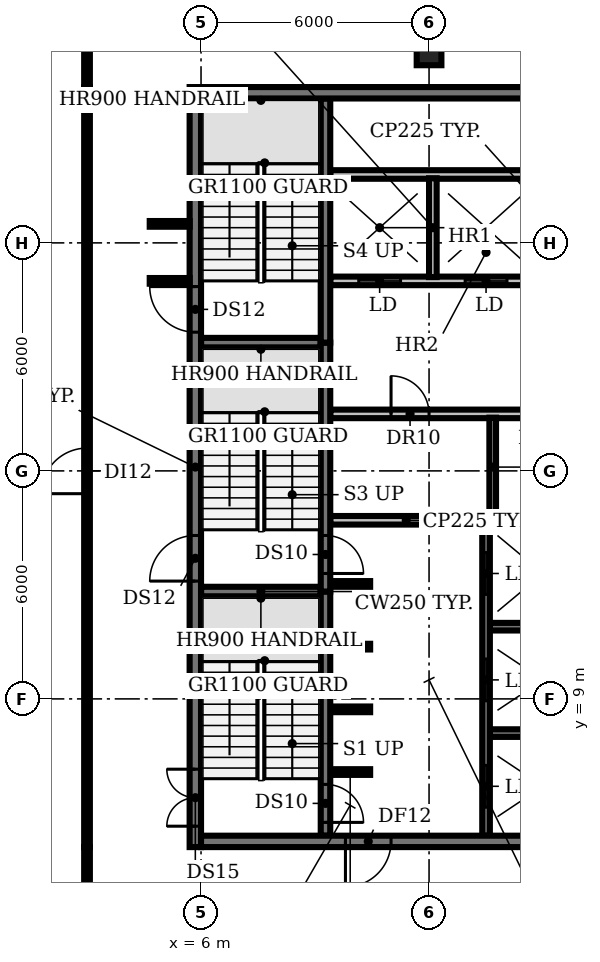
"""IFC4 building model, lengths in metres.
Left out: names, types, materials, properties, quantities, classifications, styles, units other than length and angle.
Written with IfcOpenShell. Run it as: python <this file> out.ifc"""

import sys

from ifc_helpers import new_model, si_unit, direction, frame, frame_2d, origin, origin_2d, place, context, subcontext, project, spatial, rectangle, extrude, element, fill, save


model = new_model("IFC4")
c1 = context("Model", 3, precision=1e-05, world=origin(), true_north=direction((0.0, 1.0)))
c2 = subcontext(c1, "Body", "Model", "MODEL_VIEW")
j1 = project(units=[si_unit("LENGTHUNIT", "METRE"), si_unit("PLANEANGLEUNIT", "RADIAN")], contexts=[c1])
p1 = place(None, origin())
s1 = spatial("IfcSite", under=j1, at=p1, CompositionType="ELEMENT")
p2 = place(p1, origin())
s2 = spatial("IfcBuilding", under=s1, at=p2, CompositionType="ELEMENT")
p3 = place(p2, frame((0.0, 0.0, 281.0)))
s3 = spatial("IfcBuildingStorey", under=s2, at=p3, CompositionType="ELEMENT", Elevation=281.0)
p4 = place(p3, frame((12.0, 26.0, 0.0), z_axis=(0.0, 0.0, 1.0), x_axis=(1.0, 0.0, 0.0)))
e1 = element("IfcColumn", 1, at=p4, inside=s3, PredefinedType="COLUMN", context=c2, shape_type="SweptSolid", body=[
    extrude(rectangle(XDim=0.65, YDim=0.65, at=origin_2d()), origin(), (0.0, 0.0, 1.0), 3.85),
])
p5 = place(p3, frame((9.4, 7.075, 0.0), z_axis=(0.0, 0.0, 1.0), x_axis=(1.0, 0.0, 0.0)))
e2 = element("IfcWall", 2, at=p5, inside=s3, PredefinedType="SHEAR", context=c2, shape_type="SweptSolid", body=[
    extrude(rectangle(XDim=1.05, YDim=0.15, at=frame_2d((0.525, 0.0))), origin(), (0.0, 0.0, 1.0), 3.85),
])
p6 = place(p3, frame((13.6, 8.1, 0.0), z_axis=(0.0, 0.0, 1.0), x_axis=(1.0, 0.0, 0.0)))
e3 = element("IfcWall", 3, at=p6, inside=s3, PredefinedType="SHEAR", context=c2, shape_type="SweptSolid", body=[
    extrude(rectangle(XDim=2.8, YDim=0.2, at=frame_2d((1.4, 0.0))), origin(), (0.0, 0.0, 1.0), 3.85),
])
for number, where, z_axis, x_axis in (
    (4, (9.4, 8.725, 0.0), (0.0, 0.0, 1.0), (1.0, 0.0, 0.0)),
    (5, (9.4, 10.375, 0.0), (0.0, 0.0, 1.0), (1.0, 0.0, 0.0)),
):
    element("IfcWall", number, at=place(p3, frame(where, z_axis=z_axis, x_axis=x_axis)), inside=s3, PredefinedType="SHEAR", context=c2, shape_type="SweptSolid", body=[
        extrude(rectangle(XDim=1.05, YDim=0.15, at=frame_2d((0.525, 0.0))), origin(), (0.0, 0.0, 1.0), 3.85),
    ])
p7 = place(p3, frame((13.6, 10.9, 0.0), z_axis=(0.0, 0.0, 1.0), x_axis=(1.0, 0.0, 0.0)))
e6 = element("IfcWall", 6, at=p7, inside=s3, PredefinedType="SHEAR", context=c2, shape_type="SweptSolid", body=[
    extrude(rectangle(XDim=2.8, YDim=0.2, at=frame_2d((1.4, 0.0))), origin(), (0.0, 0.0, 1.0), 3.85),
])
p8 = place(p3, frame((6.0, 11.825, 0.0), z_axis=(0.0, 0.0, 1.0), x_axis=(1.0, 0.0, 0.0)))
e7 = element("IfcWall", 7, at=p8, inside=s3, PredefinedType="SHEAR", context=c2, shape_type="SweptSolid", body=[
    extrude(rectangle(XDim=3.15, YDim=0.25, at=frame_2d((1.575, 0.0))), origin(), (0.0, 0.0, 1.0), 3.85),
])
p9 = place(p3, frame((9.4, 12.025, 0.0), z_axis=(0.0, 0.0, 1.0), x_axis=(1.0, 0.0, 0.0)))
e8 = element("IfcWall", 8, at=p9, inside=s3, PredefinedType="SHEAR", context=c2, shape_type="SweptSolid", body=[
    extrude(rectangle(XDim=1.05, YDim=0.15, at=frame_2d((0.525, 0.0))), origin(), (0.0, 0.0, 1.0), 3.85),
])
p10 = place(p3, frame((9.4, 13.7, 0.0), z_axis=(0.0, 0.0, 1.0), x_axis=(1.0, 0.0, 0.0)))
e9 = element("IfcWall", 9, at=p10, inside=s3, PredefinedType="PARTITIONING", context=c2, shape_type="SweptSolid", body=[
    extrude(rectangle(XDim=4.0, YDim=0.225, at=frame_2d((2.0, 0.0))), origin(), (0.0, 0.0, 1.0), 3.85),
])
p11 = place(p3, frame((13.75, 13.7, 0.0), z_axis=(0.0, 0.0, 1.0), x_axis=(1.0, 0.0, 0.0)))
e10 = element("IfcWall", 10, at=p11, inside=s3, PredefinedType="SHEAR", context=c2, shape_type="SweptSolid", body=[
    extrude(rectangle(XDim=2.45, YDim=0.2, at=frame_2d((1.225, 0.0))), origin(), (0.0, 0.0, 1.0), 3.85),
])
p12 = place(p3, frame((9.4, 16.5, 0.0), z_axis=(0.0, 0.0, 1.0), x_axis=(1.0, 0.0, 0.0)))
e11 = element("IfcWall", 11, at=p12, inside=s3, PredefinedType="PARTITIONING", context=c2, shape_type="SweptSolid", body=[
    extrude(rectangle(XDim=14.6, YDim=0.225, at=frame_2d((7.3, 0.0))), origin(), (0.0, 0.0, 1.0), 3.85),
])
p13 = place(p12, frame((1.6, 0.0, 0.0)))
e12 = element("IfcOpeningElement", 12, at=p13, cuts=e11, PredefinedType="OPENING", context=c2, shape_type="SweptSolid", body=[
    extrude(rectangle(XDim=1.0, YDim=2.1, at=frame_2d((0.5, 1.05))), frame((0.0, 0.123, 0.0), z_axis=(0.0, -1.0, 0.0), x_axis=(1.0, 0.0, 0.0)), (0.0, 0.0, 1.0), 0.245),
])
p14 = place(p12, frame((5.125, 0.0, 0.0)))
e13 = element("IfcOpeningElement", 13, at=p14, cuts=e11, PredefinedType="OPENING", context=c2, shape_type="SweptSolid", body=[
    extrude(rectangle(XDim=0.9, YDim=2.1, at=frame_2d((0.45, 1.05))), frame((0.0, 0.123, 0.0), z_axis=(0.0, -1.0, 0.0), x_axis=(1.0, 0.0, 0.0)), (0.0, 0.0, 1.0), 0.245),
])
p15 = place(p12, frame((7.675, 0.0, 0.0)))
e14 = element("IfcOpeningElement", 14, at=p15, cuts=e11, PredefinedType="OPENING", context=c2, shape_type="SweptSolid", body=[
    extrude(rectangle(XDim=0.9, YDim=2.1, at=frame_2d((0.45, 1.05))), frame((0.0, 0.123, 0.0), z_axis=(0.0, -1.0, 0.0), x_axis=(1.0, 0.0, 0.0)), (0.0, 0.0, 1.0), 0.245),
])
p16 = place(p12, frame((9.775, 0.0, 0.0)))
e15 = element("IfcOpeningElement", 15, at=p16, cuts=e11, PredefinedType="OPENING", context=c2, shape_type="SweptSolid", body=[
    extrude(rectangle(XDim=0.9, YDim=2.1, at=frame_2d((0.45, 1.05))), frame((0.0, 0.123, 0.0), z_axis=(0.0, -1.0, 0.0), x_axis=(1.0, 0.0, 0.0)), (0.0, 0.0, 1.0), 0.245),
])
p17 = place(p12, frame((12.4, 0.0, 0.0)))
e16 = element("IfcOpeningElement", 16, at=p17, cuts=e11, PredefinedType="OPENING", context=c2, shape_type="SweptSolid", body=[
    extrude(rectangle(XDim=1.0, YDim=2.1, at=frame_2d((0.5, 1.05))), frame((0.0, 0.123, 0.0), z_axis=(0.0, -1.0, 0.0), x_axis=(1.0, 0.0, 0.0)), (0.0, 0.0, 1.0), 0.245),
])
p18 = place(p3, frame((6.0, 18.375, 0.0), z_axis=(0.0, 0.0, 1.0), x_axis=(1.0, 0.0, 0.0)))
e17 = element("IfcWall", 17, at=p18, inside=s3, PredefinedType="SHEAR", context=c2, shape_type="SweptSolid", body=[
    extrude(rectangle(XDim=3.15, YDim=0.25, at=frame_2d((1.575, 0.0))), origin(), (0.0, 0.0, 1.0), 3.85),
])
p19 = place(p3, frame((24.0, 20.0, 0.0), z_axis=(0.0, 0.0, 1.0), x_axis=(-1.0, 0.0, 0.0)))
e18 = element("IfcWall", 18, at=p19, inside=s3, PredefinedType="PARTITIONING", context=c2, shape_type="SweptSolid", body=[
    extrude(rectangle(XDim=14.6, YDim=0.225, at=frame_2d((7.3, 0.0))), origin(), (0.0, 0.0, 1.0), 3.85),
])
p20 = place(p19, frame((12.75, 0.0, 0.0)))
e19 = element("IfcOpeningElement", 19, at=p20, cuts=e18, PredefinedType="OPENING", context=c2, shape_type="SweptSolid", body=[
    extrude(rectangle(XDim=1.1, YDim=2.1, at=frame_2d((0.55, 1.05))), frame((0.0, 0.123, 0.0), z_axis=(0.0, -1.0, 0.0), x_axis=(1.0, 0.0, 0.0)), (0.0, 0.0, 1.0), 0.245),
])
p21 = place(p19, frame((9.95, 0.0, 0.0)))
e20 = element("IfcOpeningElement", 20, at=p21, cuts=e18, PredefinedType="OPENING", context=c2, shape_type="SweptSolid", body=[
    extrude(rectangle(XDim=1.1, YDim=2.1, at=frame_2d((0.55, 1.05))), frame((0.0, 0.123, 0.0), z_axis=(0.0, -1.0, 0.0), x_axis=(1.0, 0.0, 0.0)), (0.0, 0.0, 1.0), 0.245),
])
p22 = place(p19, frame((7.15, 0.0, 0.0)))
e21 = element("IfcOpeningElement", 21, at=p22, cuts=e18, PredefinedType="OPENING", context=c2, shape_type="SweptSolid", body=[
    extrude(rectangle(XDim=1.1, YDim=2.1, at=frame_2d((0.55, 1.05))), frame((0.0, 0.123, 0.0), z_axis=(0.0, -1.0, 0.0), x_axis=(1.0, 0.0, 0.0)), (0.0, 0.0, 1.0), 0.245),
])
p23 = place(p19, frame((4.35, 0.0, 0.0)))
e22 = element("IfcOpeningElement", 22, at=p23, cuts=e18, PredefinedType="OPENING", context=c2, shape_type="SweptSolid", body=[
    extrude(rectangle(XDim=1.1, YDim=2.1, at=frame_2d((0.55, 1.05))), frame((0.0, 0.123, 0.0), z_axis=(0.0, -1.0, 0.0), x_axis=(1.0, 0.0, 0.0)), (0.0, 0.0, 1.0), 0.245),
])
p24 = place(p19, frame((1.2, 0.0, 0.0)))
e23 = element("IfcOpeningElement", 23, at=p24, cuts=e18, PredefinedType="OPENING", context=c2, shape_type="SweptSolid", body=[
    extrude(rectangle(XDim=1.0, YDim=2.1, at=frame_2d((0.5, 1.05))), frame((0.0, 0.123, 0.0), z_axis=(0.0, -1.0, 0.0), x_axis=(1.0, 0.0, 0.0)), (0.0, 0.0, 1.0), 0.245),
])
p25 = place(p3, frame((9.4, 22.8, 0.0), z_axis=(0.0, 0.0, 1.0), x_axis=(1.0, 0.0, 0.0)))
e24 = element("IfcWall", 24, at=p25, inside=s3, PredefinedType="PARTITIONING", context=c2, shape_type="SweptSolid", body=[
    extrude(rectangle(XDim=14.6, YDim=0.225, at=frame_2d((7.3, 0.0))), origin(), (0.0, 0.0, 1.0), 3.85),
])
p26 = place(p3, frame((9.275, 11.825, 0.0), z_axis=(0.0, 0.0, 1.0), x_axis=(0.0, -1.0, 0.0)))
e25 = element("IfcWall", 25, at=p26, inside=s3, PredefinedType="SHEAR", context=c2, shape_type="SweptSolid", body=[
    extrude(rectangle(XDim=6.425, YDim=0.25, at=frame_2d((3.212, 0.0))), origin(), (0.0, 0.0, 1.0), 3.85),
])
p27 = place(p26, frame((5.075, 0.0, 0.0)))
e26 = element("IfcOpeningElement", 26, at=p27, cuts=e25, PredefinedType="OPENING", context=c2, shape_type="SweptSolid", body=[
    extrude(rectangle(XDim=1.0, YDim=2.1, at=frame_2d((0.5, 1.05))), frame((0.0, 0.135, 0.0), z_axis=(0.0, -1.0, 0.0), x_axis=(1.0, 0.0, 0.0)), (0.0, 0.0, 1.0), 0.27),
])
p28 = place(p3, frame((9.275, 18.375, 0.0), z_axis=(0.0, 0.0, 1.0), x_axis=(0.0, -1.0, 0.0)))
e27 = element("IfcWall", 27, at=p28, inside=s3, PredefinedType="SHEAR", context=c2, shape_type="SweptSolid", body=[
    extrude(rectangle(XDim=6.55, YDim=0.25, at=frame_2d((3.275, 0.0))), origin(), (0.0, 0.0, 1.0), 3.85),
])
p29 = place(p28, frame((5.075, 0.0, 0.0)))
e28 = element("IfcOpeningElement", 28, at=p29, cuts=e27, PredefinedType="OPENING", context=c2, shape_type="SweptSolid", body=[
    extrude(rectangle(XDim=1.0, YDim=2.1, at=frame_2d((0.5, 1.05))), frame((0.0, 0.135, 0.0), z_axis=(0.0, -1.0, 0.0), x_axis=(1.0, 0.0, 0.0)), (0.0, 0.0, 1.0), 0.27),
])
p30 = place(p3, frame((9.275, 18.375, 0.0), z_axis=(0.0, 0.0, 1.0), x_axis=(0.0, 1.0, 0.0)))
e29 = element("IfcWall", 29, at=p30, inside=s3, PredefinedType="SHEAR", context=c2, shape_type="SweptSolid", body=[
    extrude(rectangle(XDim=6.425, YDim=0.25, at=frame_2d((3.212, 0.0))), origin(), (0.0, 0.0, 1.0), 3.85),
])
p31 = place(p3, frame((12.1, 20.1, 0.0), z_axis=(0.0, 0.0, 1.0), x_axis=(0.0, 1.0, 0.0)))
e30 = element("IfcWall", 30, at=p31, inside=s3, PredefinedType="SOLIDWALL", context=c2, shape_type="SweptSolid", body=[
    extrude(rectangle(XDim=2.6, YDim=0.2, at=frame_2d((1.3, 0.0))), origin(), (0.0, 0.0, 1.0), 3.85),
])
p32 = place(p3, frame((13.5, 5.4, 0.0), z_axis=(0.0, 0.0, 1.0), x_axis=(0.0, 1.0, 0.0)))
e31 = element("IfcWall", 31, at=p32, inside=s3, PredefinedType="SHEAR", context=c2, shape_type="SweptSolid", body=[
    extrude(rectangle(XDim=8.2, YDim=0.2, at=frame_2d((4.1, 0.0))), origin(), (0.0, 0.0, 1.0), 3.85),
])
p33 = place(p32, frame((0.75, 0.0, 0.0)))
e32 = element("IfcOpeningElement", 32, at=p33, cuts=e31, PredefinedType="OPENING", context=c2, shape_type="SweptSolid", body=[
    extrude(rectangle(XDim=1.1, YDim=2.1, at=frame_2d((0.55, 1.05))), frame((0.0, 0.11, 0.0), z_axis=(0.0, -1.0, 0.0), x_axis=(1.0, 0.0, 0.0)), (0.0, 0.0, 1.0), 0.22),
])
p34 = place(p32, frame((3.55, 0.0, 0.0)))
e33 = element("IfcOpeningElement", 33, at=p34, cuts=e31, PredefinedType="OPENING", context=c2, shape_type="SweptSolid", body=[
    extrude(rectangle(XDim=1.1, YDim=2.1, at=frame_2d((0.55, 1.05))), frame((0.0, 0.11, 0.0), z_axis=(0.0, -1.0, 0.0), x_axis=(1.0, 0.0, 0.0)), (0.0, 0.0, 1.0), 0.22),
])
p35 = place(p32, frame((6.35, 0.0, 0.0)))
e34 = element("IfcOpeningElement", 34, at=p35, cuts=e31, PredefinedType="OPENING", context=c2, shape_type="SweptSolid", body=[
    extrude(rectangle(XDim=1.1, YDim=2.1, at=frame_2d((0.55, 1.05))), frame((0.0, 0.11, 0.0), z_axis=(0.0, -1.0, 0.0), x_axis=(1.0, 0.0, 0.0)), (0.0, 0.0, 1.0), 0.22),
])
p36 = place(p3, frame((13.675, 13.8, 0.0), z_axis=(0.0, 0.0, 1.0), x_axis=(0.0, 1.0, 0.0)))
e35 = element("IfcWall", 35, at=p36, inside=s3, PredefinedType="PARTITIONING", context=c2, shape_type="SweptSolid", body=[
    extrude(rectangle(XDim=2.6, YDim=0.175, at=frame_2d((1.3, 0.0))), origin(), (0.0, 0.0, 1.0), 3.85),
])
p37 = place(p3, frame((5.85, 5.1, 0.0), z_axis=(0.0, 0.0, 1.0), x_axis=(0.0, 1.0, 0.0)))
e36 = element("IfcWall", 36, at=p37, inside=s3, PredefinedType="SHEAR", context=c2, shape_type="SweptSolid", body=[
    extrude(rectangle(XDim=20.0, YDim=0.3, at=frame_2d((10.0, 0.0))), origin(), (0.0, 0.0, 1.0), 3.85),
])
p38 = place(p37, frame((0.55, 0.0, 0.0)))
e37 = element("IfcOpeningElement", 37, at=p38, cuts=e36, PredefinedType="OPENING", context=c2, shape_type="SweptSolid", body=[
    extrude(rectangle(XDim=1.5, YDim=2.1, at=frame_2d((0.75, 1.05))), frame((0.0, 0.16, 0.0), z_axis=(0.0, -1.0, 0.0), x_axis=(1.0, 0.0, 0.0)), (0.0, 0.0, 1.0), 0.32),
])
p39 = place(p37, frame((7.0, 0.0, 0.0)))
e38 = element("IfcOpeningElement", 38, at=p39, cuts=e36, PredefinedType="OPENING", context=c2, shape_type="SweptSolid", body=[
    extrude(rectangle(XDim=1.2, YDim=2.1, at=frame_2d((0.6, 1.05))), frame((0.0, 0.16, 0.0), z_axis=(0.0, -1.0, 0.0), x_axis=(1.0, 0.0, 0.0)), (0.0, 0.0, 1.0), 0.32),
])
p40 = place(p37, frame((13.55, 0.0, 0.0)))
e39 = element("IfcOpeningElement", 39, at=p40, cuts=e36, PredefinedType="OPENING", context=c2, shape_type="SweptSolid", body=[
    extrude(rectangle(XDim=1.2, YDim=2.1, at=frame_2d((0.6, 1.05))), frame((0.0, 0.16, 0.0), z_axis=(0.0, -1.0, 0.0), x_axis=(1.0, 0.0, 0.0)), (0.0, 0.0, 1.0), 0.32),
])
p41 = place(p3, frame((24.0, 5.25, 0.0), z_axis=(0.0, 0.0, 1.0), x_axis=(-1.0, 0.0, 0.0)))
e40 = element("IfcWall", 40, at=p41, inside=s3, PredefinedType="SHEAR", context=c2, shape_type="SweptSolid", body=[
    extrude(rectangle(XDim=18.0, YDim=0.3, at=frame_2d((9.0, 0.0))), origin(), (0.0, 0.0, 1.0), 3.85),
])
p42 = place(p41, frame((13.0, 0.0, 0.0)))
e41 = element("IfcOpeningElement", 41, at=p42, cuts=e40, PredefinedType="OPENING", context=c2, shape_type="SweptSolid", body=[
    extrude(rectangle(XDim=1.2, YDim=2.1, at=frame_2d((0.6, 1.05))), frame((0.0, 0.16, 0.0), z_axis=(0.0, -1.0, 0.0), x_axis=(1.0, 0.0, 0.0)), (0.0, 0.0, 1.0), 0.32),
])
p43 = place(p41, frame((4.9, 0.0, 0.0)))
e42 = element("IfcOpeningElement", 42, at=p43, cuts=e40, PredefinedType="OPENING", context=c2, shape_type="SweptSolid", body=[
    extrude(rectangle(XDim=1.0, YDim=2.1, at=frame_2d((0.5, 1.05))), frame((0.0, 0.16, 0.0), z_axis=(0.0, -1.0, 0.0), x_axis=(1.0, 0.0, 0.0)), (0.0, 0.0, 1.0), 0.32),
])
p44 = place(p3, frame((6.0, 24.95, 0.0), z_axis=(0.0, 0.0, 1.0), x_axis=(1.0, 0.0, 0.0)))
e43 = element("IfcWall", 43, at=p44, inside=s3, PredefinedType="SHEAR", context=c2, shape_type="SweptSolid", body=[
    extrude(rectangle(XDim=18.0, YDim=0.3, at=frame_2d((9.0, 0.0))), origin(), (0.0, 0.0, 1.0), 3.85),
])
p45 = place(p3, frame((3.0, 1.2, 0.0), z_axis=(0.0, 0.0, 1.0), x_axis=(0.0, 1.0, 0.0)))
e44 = element("IfcWall", 44, at=p45, inside=s3, PredefinedType="PARTITIONING", context=c2, shape_type="SweptSolid", body=[
    extrude(rectangle(XDim=3.9, YDim=0.15, at=frame_2d((1.95, 0.0))), origin(), (0.0, 0.0, 1.0), 2.9),
])
p46 = place(p3, frame((3.0, 5.1, 0.0), z_axis=(0.0, 0.0, 1.0), x_axis=(0.0, 1.0, 0.0)))
e45 = element("IfcWall", 45, at=p46, inside=s3, PredefinedType="PARTITIONING", context=c2, shape_type="SweptSolid", body=[
    extrude(rectangle(XDim=20.0, YDim=0.15, at=frame_2d((10.0, 0.0))), origin(), (0.0, 0.0, 1.0), 2.9),
])
p47 = place(p46, frame((9.3, 0.0, 0.0)))
e46 = element("IfcOpeningElement", 46, at=p47, cuts=e45, PredefinedType="OPENING", context=c2, shape_type="SweptSolid", body=[
    extrude(rectangle(XDim=1.2, YDim=2.1, at=frame_2d((0.6, 1.05))), frame((0.0, 0.085, 0.0), z_axis=(0.0, -1.0, 0.0), x_axis=(1.0, 0.0, 0.0)), (0.0, 0.0, 1.0), 0.17),
])
p48 = place(p3, frame((3.0, 25.1, 0.0), z_axis=(0.0, 0.0, 1.0), x_axis=(0.0, 1.0, 0.0)))
e47 = element("IfcWall", 47, at=p48, inside=s3, PredefinedType="PARTITIONING", context=c2, shape_type="SweptSolid", body=[
    extrude(rectangle(XDim=3.9, YDim=0.15, at=frame_2d((1.95, 0.0))), origin(), (0.0, 0.0, 1.0), 2.9),
])
for number, where, z_axis, x_axis in (
    (48, (4.65, 20.0, 0.0), (0.0, 0.0, 1.0), (1.0, 0.0, 0.0)),
    (49, (4.65, 21.5, 0.0), (0.0, 0.0, 1.0), (1.0, 0.0, 0.0)),
):
    element("IfcWall", number, at=place(p3, frame(where, z_axis=z_axis, x_axis=x_axis)), inside=s3, PredefinedType="PARTITIONING", context=c2, shape_type="SweptSolid", body=[
        extrude(rectangle(XDim=1.05, YDim=0.15, at=frame_2d((0.525, 0.0))), origin(), (0.0, 0.0, 1.0), 2.9),
    ])
p49 = place(p13, origin())
e50 = element("IfcDoor", 50, at=p49, inside=s3, OperationType="SINGLE_SWING_LEFT", PredefinedType="DOOR", context=c2, shape_type="SweptSolid", body=[
    extrude(rectangle(XDim=1.0, YDim=2.1, at=frame_2d((0.5, 1.05))), frame((0.0, 0.025, 0.0), z_axis=(0.0, -1.0, 0.0), x_axis=(1.0, 0.0, 0.0)), (0.0, 0.0, 1.0), 0.05),
])
fill(e12, e50)
p50 = place(p20, origin())
e51 = element("IfcDoor", 51, at=p50, inside=s3, OperationType="DOUBLE_DOOR_SLIDING", PredefinedType="DOOR", context=c2, shape_type="SweptSolid", body=[
    extrude(rectangle(XDim=1.1, YDim=2.1, at=frame_2d((0.55, 1.05))), frame((0.0, 0.025, 0.0), z_axis=(0.0, -1.0, 0.0), x_axis=(1.0, 0.0, 0.0)), (0.0, 0.0, 1.0), 0.05),
])
fill(e19, e51)
p51 = place(p21, origin())
e52 = element("IfcDoor", 52, at=p51, inside=s3, OperationType="DOUBLE_DOOR_SLIDING", PredefinedType="DOOR", context=c2, shape_type="SweptSolid", body=[
    extrude(rectangle(XDim=1.1, YDim=2.1, at=frame_2d((0.55, 1.05))), frame((0.0, 0.025, 0.0), z_axis=(0.0, -1.0, 0.0), x_axis=(1.0, 0.0, 0.0)), (0.0, 0.0, 1.0), 0.05),
])
fill(e20, e52)
p52 = place(p27, origin())
e53 = element("IfcDoor", 53, at=p52, inside=s3, OperationType="SINGLE_SWING_RIGHT", PredefinedType="DOOR", context=c2, shape_type="SweptSolid", body=[
    extrude(rectangle(XDim=1.0, YDim=2.1, at=frame_2d((0.5, 1.05))), frame((0.0, 0.025, 0.0), z_axis=(0.0, -1.0, 0.0), x_axis=(1.0, 0.0, 0.0)), (0.0, 0.0, 1.0), 0.05),
])
fill(e26, e53)
p53 = place(p29, origin())
e54 = element("IfcDoor", 54, at=p53, inside=s3, OperationType="SINGLE_SWING_RIGHT", PredefinedType="DOOR", context=c2, shape_type="SweptSolid", body=[
    extrude(rectangle(XDim=1.0, YDim=2.1, at=frame_2d((0.5, 1.05))), frame((0.0, 0.025, 0.0), z_axis=(0.0, -1.0, 0.0), x_axis=(1.0, 0.0, 0.0)), (0.0, 0.0, 1.0), 0.05),
])
fill(e28, e54)
p54 = place(p33, origin())
e55 = element("IfcDoor", 55, at=p54, inside=s3, OperationType="DOUBLE_DOOR_SLIDING", PredefinedType="DOOR", context=c2, shape_type="SweptSolid", body=[
    extrude(rectangle(XDim=1.1, YDim=2.1, at=frame_2d((0.55, 1.05))), frame((0.0, 0.025, 0.0), z_axis=(0.0, -1.0, 0.0), x_axis=(1.0, 0.0, 0.0)), (0.0, 0.0, 1.0), 0.05),
])
fill(e32, e55)
p55 = place(p34, origin())
e56 = element("IfcDoor", 56, at=p55, inside=s3, OperationType="DOUBLE_DOOR_SLIDING", PredefinedType="DOOR", context=c2, shape_type="SweptSolid", body=[
    extrude(rectangle(XDim=1.1, YDim=2.1, at=frame_2d((0.55, 1.05))), frame((0.0, 0.025, 0.0), z_axis=(0.0, -1.0, 0.0), x_axis=(1.0, 0.0, 0.0)), (0.0, 0.0, 1.0), 0.05),
])
fill(e33, e56)
p56 = place(p35, origin())
e57 = element("IfcDoor", 57, at=p56, inside=s3, OperationType="DOUBLE_DOOR_SLIDING", PredefinedType="DOOR", context=c2, shape_type="SweptSolid", body=[
    extrude(rectangle(XDim=1.1, YDim=2.1, at=frame_2d((0.55, 1.05))), frame((0.0, 0.025, 0.0), z_axis=(0.0, -1.0, 0.0), x_axis=(1.0, 0.0, 0.0)), (0.0, 0.0, 1.0), 0.05),
])
fill(e34, e57)
p57 = place(p38, origin())
e58 = element("IfcDoor", 58, at=p57, inside=s3, OperationType="DOUBLE_DOOR_SINGLE_SWING", PredefinedType="DOOR", context=c2, shape_type="SweptSolid", body=[
    extrude(rectangle(XDim=1.5, YDim=2.1, at=frame_2d((0.75, 1.05))), frame((0.0, 0.025, 0.0), z_axis=(0.0, -1.0, 0.0), x_axis=(1.0, 0.0, 0.0)), (0.0, 0.0, 1.0), 0.05),
])
fill(e37, e58)
p58 = place(p39, origin())
e59 = element("IfcDoor", 59, at=p58, inside=s3, OperationType="SINGLE_SWING_LEFT", PredefinedType="DOOR", context=c2, shape_type="SweptSolid", body=[
    extrude(rectangle(XDim=1.2, YDim=2.1, at=frame_2d((0.6, 1.05))), frame((0.0, 0.025, 0.0), z_axis=(0.0, -1.0, 0.0), x_axis=(1.0, 0.0, 0.0)), (0.0, 0.0, 1.0), 0.05),
])
fill(e38, e59)
p59 = place(p40, origin())
e60 = element("IfcDoor", 60, at=p59, inside=s3, OperationType="SINGLE_SWING_RIGHT", PredefinedType="DOOR", context=c2, shape_type="SweptSolid", body=[
    extrude(rectangle(XDim=1.2, YDim=2.1, at=frame_2d((0.6, 1.05))), frame((0.0, 0.025, 0.0), z_axis=(0.0, -1.0, 0.0), x_axis=(1.0, 0.0, 0.0)), (0.0, 0.0, 1.0), 0.05),
])
fill(e39, e60)
p60 = place(p42, origin())
e61 = element("IfcDoor", 61, at=p60, inside=s3, OperationType="SINGLE_SWING_RIGHT", PredefinedType="DOOR", context=c2, shape_type="SweptSolid", body=[
    extrude(rectangle(XDim=1.2, YDim=2.1, at=frame_2d((0.6, 1.05))), frame((0.0, 0.025, 0.0), z_axis=(0.0, -1.0, 0.0), x_axis=(1.0, 0.0, 0.0)), (0.0, 0.0, 1.0), 0.05),
])
fill(e41, e61)
p61 = place(p47, origin())
e62 = element("IfcDoor", 62, at=p61, inside=s3, OperationType="SINGLE_SWING_LEFT", PredefinedType="DOOR", context=c2, shape_type="SweptSolid", body=[
    extrude(rectangle(XDim=1.2, YDim=2.1, at=frame_2d((0.6, 1.05))), frame((0.0, 0.025, 0.0), z_axis=(0.0, -1.0, 0.0), x_axis=(1.0, 0.0, 0.0)), (0.0, 0.0, 1.0), 0.05),
])
fill(e46, e62)
save(model, sys.argv[1])
